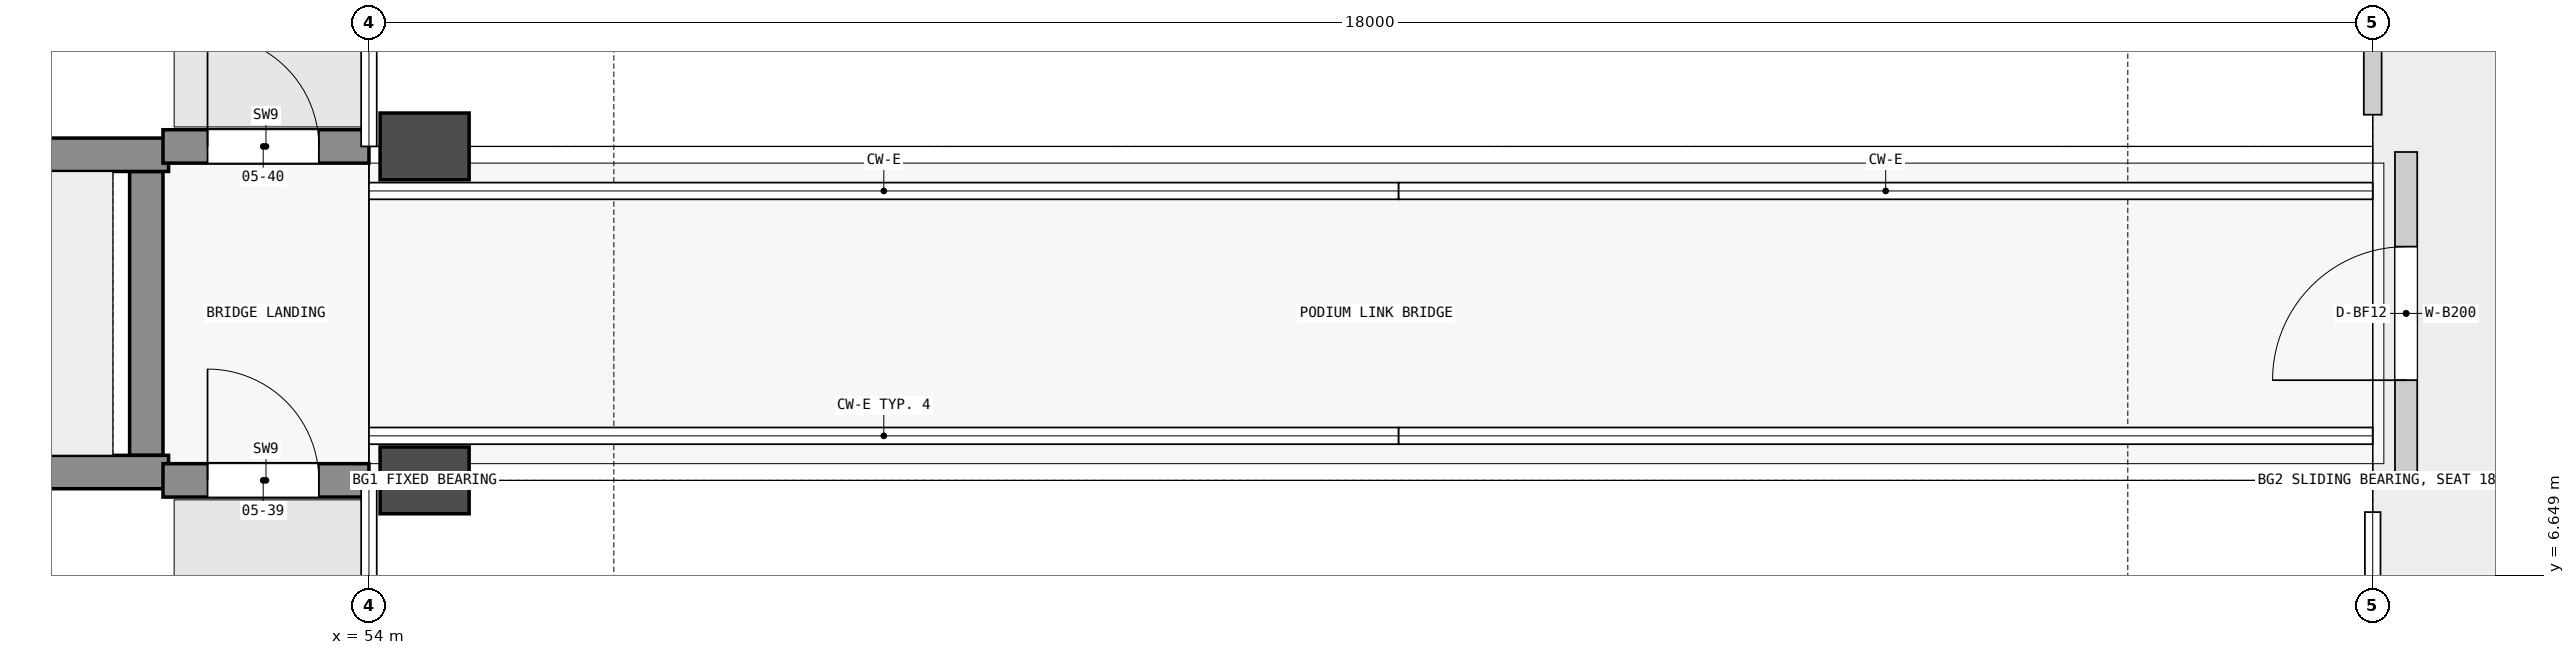
"""IFC4 building model, lengths in metres.
Left out: names, types, materials, properties, quantities, classifications, styles, units other than length and angle.
Written with IfcOpenShell. Run it as: python <this file> out.ifc"""

import sys

from ifc_helpers import new_model, si_unit, direction, frame, frame_2d, origin, place, context, subcontext, project, spatial, rectangle, extrude, element, fill, save


model = new_model("IFC4")
c1 = context("Model", 3, precision=1e-05, world=origin(), true_north=direction((0.0, 1.0)))
c2 = subcontext(c1, "Body", "Model", "MODEL_VIEW")
j1 = project(units=[si_unit("LENGTHUNIT", "METRE"), si_unit("PLANEANGLEUNIT", "RADIAN")], contexts=[c1])
p1 = place(None, origin())
s1 = spatial("IfcSite", under=j1, at=p1, CompositionType="ELEMENT")
p2 = place(p1, origin())
s2 = spatial("IfcBuilding", under=s1, at=p2, CompositionType="ELEMENT")
p3 = place(p2, frame((0.0, 0.0, 26.8)))
s3 = spatial("IfcBuildingStorey", under=s2, at=p3, CompositionType="ELEMENT", Elevation=26.8)
p4 = place(p3, frame((52.0, 7.725, 0.0), z_axis=(0.0, 0.0, 1.0), x_axis=(0.0, 1.0, 0.0)))
e1 = element("IfcWall", 1, at=p4, inside=s3, PredefinedType="SHEAR", context=c2, shape_type="SweptSolid", body=[
    extrude(rectangle(XDim=2.55, YDim=0.3, at=frame_2d((1.275, 0.0))), origin(), (0.0, 0.0, 1.0), 3.5),
])
for number, where, z_axis, x_axis in (
    (2, (45.0, 7.575, 0.0), (0.0, 0.0, 1.0), (1.0, 0.0, 0.0)),
    (3, (45.0, 10.425, 0.0), (0.0, 0.0, 1.0), (1.0, 0.0, 0.0)),
):
    element("IfcWall", number, at=place(p3, frame(where, z_axis=z_axis, x_axis=x_axis)), inside=s3, PredefinedType="SHEAR", context=c2, shape_type="SweptSolid", body=[
        extrude(rectangle(XDim=7.2, YDim=0.3, at=frame_2d((3.6, 0.0))), origin(), (0.0, 0.0, 1.0), 3.5),
    ])
p5 = place(p3, frame((52.15, 7.5, -2.2), z_axis=(0.0, 0.0, 1.0), x_axis=(1.0, 0.0, 0.0)))
e4 = element("IfcWall", 4, at=p5, inside=s3, PredefinedType="SHEAR", context=c2, shape_type="SweptSolid", body=[
    extrude(rectangle(XDim=1.85, YDim=0.3, at=frame_2d((0.925, 0.0))), origin(), (0.0, 0.0, 1.0), 5.45),
])
p6 = place(p5, frame((0.4, 0.0, 2.2)))
e5 = element("IfcOpeningElement", 5, at=p6, cuts=e4, PredefinedType="OPENING", context=c2, shape_type="SweptSolid", body=[
    extrude(rectangle(XDim=1.0, YDim=2.1, at=frame_2d((0.5, 1.05))), frame((0.0, 0.16, 0.0), z_axis=(0.0, -1.0, 0.0), x_axis=(1.0, 0.0, 0.0)), (0.0, 0.0, 1.0), 0.32),
])
p7 = place(p3, frame((52.15, 10.5, -2.2), z_axis=(0.0, 0.0, 1.0), x_axis=(1.0, 0.0, 0.0)))
e6 = element("IfcWall", 6, at=p7, inside=s3, PredefinedType="SHEAR", context=c2, shape_type="SweptSolid", body=[
    extrude(rectangle(XDim=1.85, YDim=0.3, at=frame_2d((0.925, 0.0))), origin(), (0.0, 0.0, 1.0), 5.45),
])
p8 = place(p7, frame((0.4, 0.0, 2.2)))
e7 = element("IfcOpeningElement", 7, at=p8, cuts=e6, PredefinedType="OPENING", context=c2, shape_type="SweptSolid", body=[
    extrude(rectangle(XDim=1.0, YDim=2.1, at=frame_2d((0.5, 1.05))), frame((0.0, 0.16, 0.0), z_axis=(0.0, -1.0, 0.0), x_axis=(1.0, 0.0, 0.0)), (0.0, 0.0, 1.0), 0.32),
])
p9 = place(p3, frame((72.0, 10.785, 0.0), z_axis=(0.0, 0.0, 1.0), x_axis=(0.0, 1.0, 0.0)))
e8 = element("IfcWall", 8, at=p9, inside=s3, PredefinedType="STANDARD", context=c2, shape_type="SweptSolid", body=[
    extrude(rectangle(XDim=5.108, YDim=0.16, at=frame_2d((2.554, 0.0))), origin(), (0.0, 0.0, 1.0), 3.25),
])
p10 = place(p9, frame((1.654, 0.0, 0.0)))
e9 = element("IfcOpeningElement", 9, at=p10, cuts=e8, PredefinedType="OPENING", context=c2, shape_type="SweptSolid", body=[
    extrude(rectangle(XDim=1.8, YDim=2.4, at=frame_2d((0.9, 1.2))), frame((0.0, 0.09, 0.0), z_axis=(0.0, -1.0, 0.0), x_axis=(1.0, 0.0, 0.0)), (0.0, 0.0, 1.0), 0.18),
])
p11 = place(p3, frame((72.3, 7.55, 0.0), z_axis=(0.0, 0.0, 1.0), x_axis=(0.0, 1.0, 0.0)))
e10 = element("IfcWall", 10, at=p11, inside=s3, PredefinedType="PARTITIONING", context=c2, shape_type="SweptSolid", body=[
    extrude(rectangle(XDim=2.9, YDim=0.2, at=frame_2d((1.45, 0.0))), origin(), (0.0, 0.0, 1.0), 3.25),
])
p12 = place(p11, frame((0.85, 0.0, 0.0)))
e11 = element("IfcOpeningElement", 11, at=p12, cuts=e10, PredefinedType="OPENING", context=c2, shape_type="SweptSolid", body=[
    extrude(rectangle(XDim=1.2, YDim=2.1, at=frame_2d((0.6, 1.05))), frame((0.0, 0.11, 0.0), z_axis=(0.0, -1.0, 0.0), x_axis=(1.0, 0.0, 0.0)), (0.0, 0.0, 1.0), 0.22),
])
p13 = place(p6, origin())
e12 = element("IfcDoor", 12, at=p13, inside=s3, OperationType="SINGLE_SWING_LEFT", PredefinedType="DOOR", context=c2, shape_type="SweptSolid", body=[
    extrude(rectangle(XDim=1.0, YDim=2.1, at=frame_2d((0.5, 1.05))), frame((0.0, 0.025, 0.0), z_axis=(0.0, -1.0, 0.0), x_axis=(1.0, 0.0, 0.0)), (0.0, 0.0, 1.0), 0.05),
])
fill(e5, e12)
p14 = place(p8, origin())
e13 = element("IfcDoor", 13, at=p14, inside=s3, OperationType="SINGLE_SWING_LEFT", PredefinedType="DOOR", context=c2, shape_type="SweptSolid", body=[
    extrude(rectangle(XDim=1.0, YDim=2.1, at=frame_2d((0.5, 1.05))), frame((0.0, 0.025, 0.0), z_axis=(0.0, -1.0, 0.0), x_axis=(1.0, 0.0, 0.0)), (0.0, 0.0, 1.0), 0.05),
])
fill(e7, e13)
p15 = place(p12, origin())
e14 = element("IfcDoor", 14, at=p15, inside=s3, OperationType="SINGLE_SWING_LEFT", PredefinedType="DOOR", context=c2, shape_type="SweptSolid", body=[
    extrude(rectangle(XDim=1.2, YDim=2.1, at=frame_2d((0.6, 1.05))), frame((0.0, 0.025, 0.0), z_axis=(0.0, -1.0, 0.0), x_axis=(1.0, 0.0, 0.0)), (0.0, 0.0, 1.0), 0.05),
])
fill(e11, e14)
save(model, sys.argv[1])
